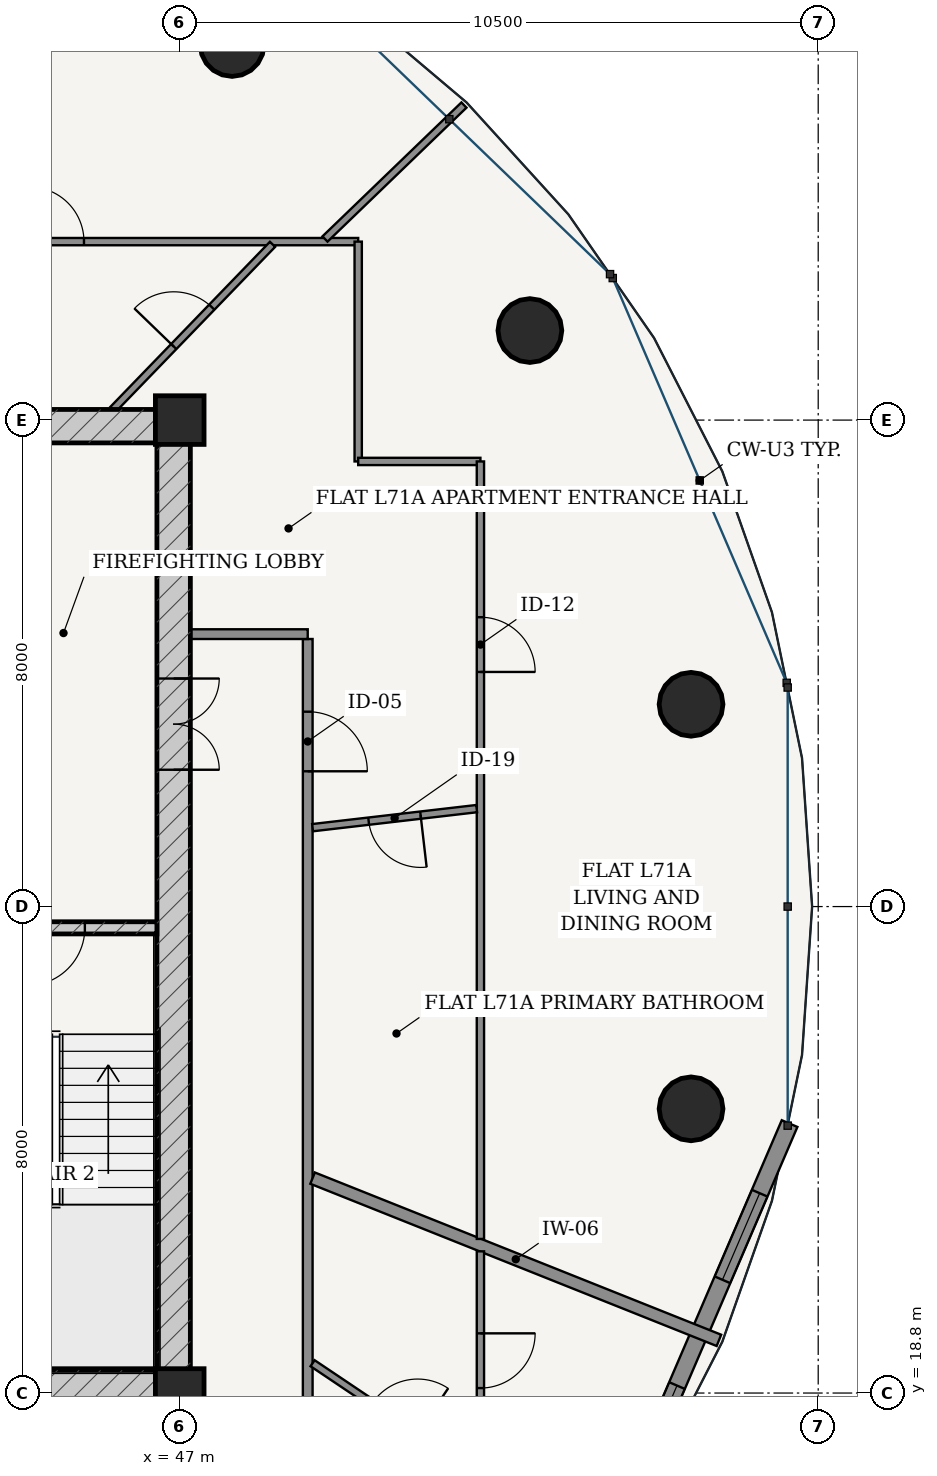
"""IFC4 building model, lengths in metres.
Left out: names, types, materials, properties, quantities, classifications, styles, units other than length and angle.
Written with IfcOpenShell. Run it as: python <this file> out.ifc"""

import sys

from ifc_helpers import new_model, si_unit, direction, frame, frame_2d, origin, origin_2d, place, context, subcontext, project, spatial, rectangle, hollow_circle, extrude, source, transform, mapped, element, fill, save


model = new_model("IFC4")
c1 = context("Model", 3, precision=1e-05, world=origin(), true_north=direction((-0.2419218956, 0.970295726276)))
c2 = subcontext(c1, "Body", "Model", "MODEL_VIEW")
j1 = project(units=[si_unit("LENGTHUNIT", "METRE"), si_unit("PLANEANGLEUNIT", "RADIAN")], contexts=[c1])
p1 = place(None, origin())
s1 = spatial("IfcSite", under=j1, at=p1, CompositionType="ELEMENT")
p2 = place(p1, origin())
s2 = spatial("IfcBuilding", under=s1, at=p2, CompositionType="ELEMENT")
p3 = place(p2, frame((0.0, 0.0, 270.7)))
s3 = spatial("IfcBuildingStorey", under=s2, at=p3, CompositionType="ELEMENT", Elevation=270.7)
for number, where, z_axis, x_axis in (
    (1, (47.0, 18.8, 0.0), (0.0, 0.0, 1.0), (1.0, 0.0, 0.0)),
    (2, (47.0, 34.8, 0.0), (0.0, 0.0, 1.0), (1.0, 0.0, 0.0)),
):
    element("IfcColumn", number, at=place(p3, frame(where, z_axis=z_axis, x_axis=x_axis)), inside=s3, PredefinedType="COLUMN", context=c2, shape_type="SweptSolid", body=[
        extrude(rectangle(XDim=0.8, YDim=0.8, at=origin_2d()), origin(), (0.0, 0.0, 1.0), 3.75),
    ])
p4 = place(p3, frame((28.825, 18.9, 0.0), z_axis=(0.0, 0.0, 1.0), x_axis=(1.0, 0.0, 0.0)))
e3 = element("IfcWall", 3, at=p4, inside=s3, PredefinedType="SHEAR", context=c2, shape_type="SweptSolid", body=[
    extrude(rectangle(XDim=18.35, YDim=0.55, at=frame_2d((9.175, 0.0))), origin(), (0.0, 0.0, 1.0), 3.49),
])
p5 = place(p4, frame((6.71, 0.0, 0.0)))
e4 = element("IfcOpeningElement", 4, at=p5, cuts=e3, PredefinedType="OPENING", context=c2, shape_type="SweptSolid", body=[
    extrude(rectangle(XDim=0.85, YDim=2.1, at=frame_2d((0.425, 1.05))), frame((0.0, 0.285, 0.0), z_axis=(0.0, -1.0, 0.0), x_axis=(1.0, 0.0, 0.0)), (0.0, 0.0, 1.0), 0.57),
])
p6 = place(p4, frame((8.75, 0.0, 0.0)))
e5 = element("IfcOpeningElement", 5, at=p6, cuts=e3, PredefinedType="OPENING", context=c2, shape_type="SweptSolid", body=[
    extrude(rectangle(XDim=0.85, YDim=2.1, at=frame_2d((0.425, 1.05))), frame((0.0, 0.285, 0.0), z_axis=(0.0, -1.0, 0.0), x_axis=(1.0, 0.0, 0.0)), (0.0, 0.0, 1.0), 0.57),
])
p7 = place(p4, frame((10.79, 0.0, 0.0)))
e6 = element("IfcOpeningElement", 6, at=p7, cuts=e3, PredefinedType="OPENING", context=c2, shape_type="SweptSolid", body=[
    extrude(rectangle(XDim=0.85, YDim=2.1, at=frame_2d((0.425, 1.05))), frame((0.0, 0.285, 0.0), z_axis=(0.0, -1.0, 0.0), x_axis=(1.0, 0.0, 0.0)), (0.0, 0.0, 1.0), 0.57),
])
p8 = place(p3, frame((28.825, 34.7, 0.0), z_axis=(0.0, 0.0, 1.0), x_axis=(1.0, 0.0, 0.0)))
e7 = element("IfcWall", 7, at=p8, inside=s3, PredefinedType="SHEAR", context=c2, shape_type="SweptSolid", body=[
    extrude(rectangle(XDim=18.35, YDim=0.55, at=frame_2d((9.175, 0.0))), origin(), (0.0, 0.0, 1.0), 3.49),
])
p9 = place(p3, frame((46.9, 19.175, 0.0), z_axis=(0.0, 0.0, 1.0), x_axis=(0.0, 1.0, 0.0)))
e8 = element("IfcWall", 8, at=p9, inside=s3, PredefinedType="SHEAR", context=c2, shape_type="SweptSolid", body=[
    extrude(rectangle(XDim=15.25, YDim=0.55, at=frame_2d((7.625, 0.0))), origin(), (0.0, 0.0, 1.0), 3.49),
])
p10 = place(p9, frame((9.875, 0.0, 0.0)))
e9 = element("IfcOpeningElement", 9, at=p10, cuts=e8, PredefinedType="OPENING", context=c2, shape_type="SweptSolid", body=[
    extrude(rectangle(XDim=1.5, YDim=2.2, at=frame_2d((0.75, 1.1))), frame((0.0, 0.285, 0.0), z_axis=(0.0, -1.0, 0.0), x_axis=(1.0, 0.0, 0.0)), (0.0, 0.0, 1.0), 0.57),
])
p11 = place(p3, frame((43.305, 26.45, 0.0), z_axis=(0.0, 0.0, 1.0), x_axis=(1.0, 0.0, 0.0)))
e10 = element("IfcWall", 10, at=p11, inside=s3, PredefinedType="SOLIDWALL", context=c2, shape_type="SweptSolid", body=[
    extrude(rectangle(XDim=3.32, YDim=0.2, at=frame_2d((1.66, 0.0))), origin(), (0.0, 0.0, 1.0), 3.49),
])
p12 = place(p11, frame((1.185, 0.0, 0.0)))
e11 = element("IfcOpeningElement", 11, at=p12, cuts=e10, PredefinedType="OPENING", context=c2, shape_type="SweptSolid", body=[
    extrude(rectangle(XDim=0.95, YDim=2.15, at=frame_2d((0.475, 1.075))), frame((0.0, 0.11, 0.0), z_axis=(0.0, -1.0, 0.0), x_axis=(1.0, 0.0, 0.0)), (0.0, 0.0, 1.0), 0.22),
])
for number, where, z_axis, x_axis in (
    (12, (55.409, 30.126, 0.0), (0.0, 0.0, 1.0), (1.0, 0.0, 0.0)),
    (13, (52.759, 36.272, 0.0), (0.0, 0.0, 1.0), (1.0, 0.0, 0.0)),
    (14, (47.861, 40.977, 0.0), (0.0, 0.0, 1.0), (1.0, 0.0, 0.0)),
    (15, (55.409, 23.474, 0.0), (0.0, 0.0, 1.0), (1.0, 0.0, 0.0)),
):
    element("IfcColumn", number, at=place(p3, frame(where, z_axis=z_axis, x_axis=x_axis)), inside=s3, PredefinedType="COLUMN", context=c2, shape_type="SweptSolid", body=[
        extrude(hollow_circle(Radius=0.525, WallThickness=0.035, at=origin_2d()), origin(), (0.0, 0.0, 1.0), 3.75),
    ])
p13 = place(p3, frame((54.074, 16.354, 0.0), z_axis=(0.0, 0.0, 1.0), x_axis=(0.394816612978, 0.918759948037, 0.0)))
e16 = element("IfcWall", 16, at=p13, inside=s3, PredefinedType="SOLIDWALL", context=c2, shape_type="SweptSolid", body=[
    extrude(rectangle(XDim=7.485, YDim=0.28, at=frame_2d((3.743, 0.0))), origin(), (0.0, 0.0, 1.0), 3.49),
])
p14 = place(p13, frame((1.246, 0.0, 0.85)))
e17 = element("IfcOpeningElement", 17, at=p14, cuts=e16, PredefinedType="OPENING", context=c2, shape_type="SweptSolid", body=[
    extrude(rectangle(XDim=1.55, YDim=1.95, at=frame_2d((0.775, 0.975))), frame((0.0, 0.15, 0.0), z_axis=(0.0, -1.0, 0.0), x_axis=(1.0, 0.0, 0.0)), (0.0, 0.0, 1.0), 0.3),
])
p15 = place(p13, frame((4.689, 0.0, 0.85)))
e18 = element("IfcOpeningElement", 18, at=p15, cuts=e16, PredefinedType="OPENING", context=c2, shape_type="SweptSolid", body=[
    extrude(rectangle(XDim=1.55, YDim=1.95, at=frame_2d((0.775, 0.975))), frame((0.0, 0.15, 0.0), z_axis=(0.0, -1.0, 0.0), x_axis=(1.0, 0.0, 0.0)), (0.0, 0.0, 1.0), 0.3),
])
p16 = place(p3, frame((49.105, 17.275, 0.0), z_axis=(0.0, 0.0, 1.0), x_axis=(0.0, 1.0, 0.0)))
e19 = element("IfcWall", 19, at=p16, inside=s3, PredefinedType="PARTITIONING", context=c2, shape_type="SweptSolid", body=[
    extrude(rectangle(XDim=13.925, YDim=0.16, at=frame_2d((6.962, 0.0))), origin(), (0.0, 0.0, 1.0), 3.015),
])
p17 = place(p16, frame((11.75, 0.0, 0.0)))
e20 = element("IfcOpeningElement", 20, at=p17, cuts=e19, PredefinedType="OPENING", context=c2, shape_type="SweptSolid", body=[
    extrude(rectangle(XDim=0.98, YDim=2.2, at=frame_2d((0.49, 1.1))), frame((0.0, 0.09, 0.0), z_axis=(0.0, -1.0, 0.0), x_axis=(1.0, 0.0, 0.0)), (0.0, 0.0, 1.0), 0.18),
])
p18 = place(p3, frame((47.175, 31.28, 0.0), z_axis=(0.0, 0.0, 1.0), x_axis=(1.0, 0.0, 0.0)))
e21 = element("IfcWall", 21, at=p18, inside=s3, PredefinedType="PARTITIONING", context=c2, shape_type="SweptSolid", body=[
    extrude(rectangle(XDim=1.93, YDim=0.16, at=frame_2d((0.965, 0.0))), origin(), (0.0, 0.0, 1.0), 3.49),
])
p19 = place(p3, frame((49.185, 22.334, 0.0), z_axis=(0.0, 0.0, 1.0), x_axis=(0.928710518269, -0.370805573389, 0.0)))
e22 = element("IfcWall", 22, at=p19, inside=s3, PredefinedType="PARTITIONING", context=c2, shape_type="SweptSolid", body=[
    extrude(rectangle(XDim=7.195, YDim=0.2, at=frame_2d((3.598, 0.0))), origin(), (0.0, 0.0, 1.0), 3.121),
])
p20 = place(p3, frame((26.065, 37.735, 0.0), z_axis=(0.0, 0.0, 1.0), x_axis=(1.0, 0.0, 0.0)))
e23 = element("IfcWall", 23, at=p20, inside=s3, PredefinedType="PARTITIONING", context=c2, shape_type="SweptSolid", body=[
    extrude(rectangle(XDim=23.87, YDim=0.12, at=frame_2d((11.935, 0.0))), origin(), (0.0, 0.0, 1.0), 3.015),
])
p21 = place(p20, frame((18.46, 0.0, 0.0)))
e24 = element("IfcOpeningElement", 24, at=p21, cuts=e23, PredefinedType="OPENING", context=c2, shape_type="SweptSolid", body=[
    extrude(rectangle(XDim=0.9, YDim=2.15, at=frame_2d((0.45, 1.075))), frame((0.0, 0.07, 0.0), z_axis=(0.0, -1.0, 0.0), x_axis=(1.0, 0.0, 0.0)), (0.0, 0.0, 1.0), 0.14),
])
p22 = place(p20, frame((3.144, 0.0, 0.0)))
e25 = element("IfcOpeningElement", 25, at=p22, cuts=e23, PredefinedType="OPENING", context=c2, shape_type="SweptSolid", body=[
    extrude(rectangle(XDim=0.9, YDim=2.15, at=frame_2d((0.45, 1.075))), frame((0.0, 0.07, 0.0), z_axis=(0.0, -1.0, 0.0), x_axis=(1.0, 0.0, 0.0)), (0.0, 0.0, 1.0), 0.14),
])
p23 = place(p3, frame((49.935, 37.735, 0.0), z_axis=(0.0, 0.0, 1.0), x_axis=(0.0, -1.0, 0.0)))
e26 = element("IfcWall", 26, at=p23, inside=s3, PredefinedType="PARTITIONING", context=c2, shape_type="SweptSolid", body=[
    extrude(rectangle(XDim=3.615, YDim=0.12, at=frame_2d((1.808, 0.0))), origin(), (0.0, 0.0, 1.0), 3.015),
])
p24 = place(p3, frame((49.935, 34.12, 0.0), z_axis=(0.0, 0.0, 1.0), x_axis=(1.0, 0.0, 0.0)))
e27 = element("IfcWall", 27, at=p24, inside=s3, PredefinedType="PARTITIONING", context=c2, shape_type="SweptSolid", body=[
    extrude(rectangle(XDim=2.01, YDim=0.12, at=frame_2d((1.005, 0.0))), origin(), (0.0, 0.0, 1.0), 3.209),
])
p25 = place(p3, frame((51.945, 34.12, 0.0), z_axis=(0.0, 0.0, 1.0), x_axis=(0.0, -1.0, 0.0)))
e28 = element("IfcWall", 28, at=p25, inside=s3, PredefinedType="PARTITIONING", context=c2, shape_type="SweptSolid", body=[
    extrude(rectangle(XDim=12.786, YDim=0.12, at=frame_2d((6.393, 0.0))), origin(), (0.0, 0.0, 1.0), 3.015),
])
p26 = place(p25, frame((2.562, 0.0, 0.0)))
e29 = element("IfcOpeningElement", 29, at=p26, cuts=e28, PredefinedType="OPENING", context=c2, shape_type="SweptSolid", body=[
    extrude(rectangle(XDim=0.9, YDim=2.15, at=frame_2d((0.45, 1.075))), frame((0.0, 0.07, 0.0), z_axis=(0.0, -1.0, 0.0), x_axis=(1.0, 0.0, 0.0)), (0.0, 0.0, 1.0), 0.14),
])
p27 = place(p3, frame((49.389, 37.778, 0.0), z_axis=(0.0, 0.0, 1.0), x_axis=(0.719985652574, 0.693988948102, 0.0)))
e30 = element("IfcWall", 30, at=p27, inside=s3, PredefinedType="PARTITIONING", context=c2, shape_type="SweptSolid", body=[
    extrude(rectangle(XDim=3.174, YDim=0.12, at=frame_2d((1.587, 0.0))), origin(), (0.0, 0.0, 1.0), 3.121),
])
p28 = place(p3, frame((49.185, 28.098, 0.0), z_axis=(0.0, 0.0, 1.0), x_axis=(0.993339475655, 0.115224503057, 0.0)))
e31 = element("IfcWall", 31, at=p28, inside=s3, PredefinedType="PARTITIONING", context=c2, shape_type="SweptSolid", body=[
    extrude(rectangle(XDim=2.716, YDim=0.12, at=frame_2d((1.358, 0.0))), origin(), (0.0, 0.0, 1.0), 3.209),
])
p29 = place(p28, frame((0.928, 0.0, 0.0)))
e32 = element("IfcOpeningElement", 32, at=p29, cuts=e31, PredefinedType="OPENING", context=c2, shape_type="SweptSolid", body=[
    extrude(rectangle(XDim=0.86, YDim=2.15, at=frame_2d((0.43, 1.075))), frame((0.0, 0.07, 0.0), z_axis=(0.0, -1.0, 0.0), x_axis=(1.0, 0.0, 0.0)), (0.0, 0.0, 1.0), 0.14),
])
p30 = place(p3, frame((45.903, 34.976, 0.0), z_axis=(0.0, 0.0, 1.0), x_axis=(0.69497417129, 0.719034700999, 0.0)))
e33 = element("IfcWall", 33, at=p30, inside=s3, PredefinedType="PARTITIONING", context=c2, shape_type="SweptSolid", body=[
    extrude(rectangle(XDim=3.775, YDim=0.12, at=frame_2d((1.887, 0.0))), origin(), (0.0, 0.0, 1.0), 3.015),
])
p31 = place(p30, frame((1.437, 0.0, 0.0)))
e34 = element("IfcOpeningElement", 34, at=p31, cuts=e33, PredefinedType="OPENING", context=c2, shape_type="SweptSolid", body=[
    extrude(rectangle(XDim=0.9, YDim=2.15, at=frame_2d((0.45, 1.075))), frame((0.0, 0.07, 0.0), z_axis=(0.0, -1.0, 0.0), x_axis=(1.0, 0.0, 0.0)), (0.0, 0.0, 1.0), 0.14),
])
p32 = place(p3, frame((51.945, 21.13, 0.0), z_axis=(0.0, 0.0, 1.0), x_axis=(0.0, -1.0, 0.0)))
e35 = element("IfcWall", 35, at=p32, inside=s3, PredefinedType="PARTITIONING", context=c2, shape_type="SweptSolid", body=[
    extrude(rectangle(XDim=6.775, YDim=0.12, at=frame_2d((3.388, 0.0))), origin(), (0.0, 0.0, 1.0), 3.015),
])
p33 = place(p32, frame((1.349, 0.0, 0.0)))
e36 = element("IfcOpeningElement", 36, at=p33, cuts=e35, PredefinedType="OPENING", context=c2, shape_type="SweptSolid", body=[
    extrude(rectangle(XDim=0.9, YDim=2.15, at=frame_2d((0.45, 1.075))), frame((0.0, 0.07, 0.0), z_axis=(0.0, -1.0, 0.0), x_axis=(1.0, 0.0, 0.0)), (0.0, 0.0, 1.0), 0.14),
])
p34 = place(p3, frame((49.185, 19.29, 0.0), z_axis=(0.0, 0.0, 1.0), x_axis=(0.830215193761, -0.557443030316, 0.0)))
e37 = element("IfcWall", 37, at=p34, inside=s3, PredefinedType="PARTITIONING", context=c2, shape_type="SweptSolid", body=[
    extrude(rectangle(XDim=3.262, YDim=0.12, at=frame_2d((1.631, 0.0))), origin(), (0.0, 0.0, 1.0), 3.209),
])
p35 = place(p34, frame((1.181, 0.0, 0.0)))
e38 = element("IfcOpeningElement", 38, at=p35, cuts=e37, PredefinedType="OPENING", context=c2, shape_type="SweptSolid", body=[
    extrude(rectangle(XDim=0.9, YDim=2.15, at=frame_2d((0.45, 1.075))), frame((0.0, 0.07, 0.0), z_axis=(0.0, -1.0, 0.0), x_axis=(1.0, 0.0, 0.0)), (0.0, 0.0, 1.0), 0.14),
])
m1 = source(origin(), c2, "Body", "SweptSolid", [
    extrude(rectangle(XDim=1.55, YDim=1.95, at=frame_2d((0.775, 0.975))), frame((0.0, 0.03, 0.0), z_axis=(0.0, -1.0, 0.0), x_axis=(1.0, 0.0, 0.0)), (0.0, 0.0, 1.0), 0.06),
])
p36 = place(p14, origin())
e39 = element("IfcWindow", 39, at=p36, inside=s3, PartitioningType="SINGLE_PANEL", PredefinedType="WINDOW", context=c2, shape_type="MappedRepresentation", body=[
    mapped(m1, transform((0.0, 0.0, 0.0), scale=1.0)),
])
fill(e17, e39)
p37 = place(p15, origin())
e40 = element("IfcWindow", 40, at=p37, inside=s3, PartitioningType="SINGLE_PANEL", PredefinedType="WINDOW", context=c2, shape_type="MappedRepresentation", body=[
    mapped(m1, transform((0.0, 0.0, 0.0), scale=1.0)),
])
fill(e18, e40)
m2 = source(origin(), c2, "Body", "SweptSolid", [
    extrude(rectangle(XDim=1.5, YDim=2.2, at=frame_2d((0.75, 1.1))), frame((0.0, 0.025, 0.0), z_axis=(0.0, -1.0, 0.0), x_axis=(1.0, 0.0, 0.0)), (0.0, 0.0, 1.0), 0.05),
])
p38 = place(p10, frame((1.5, 0.0, 0.0), z_axis=(0.0, 0.0, 1.0), x_axis=(-1.0, 0.0, 0.0)))
e41 = element("IfcDoor", 41, at=p38, inside=s3, OperationType="DOUBLE_DOOR_SINGLE_SWING", PredefinedType="DOOR", context=c2, shape_type="MappedRepresentation", body=[
    mapped(m2, transform((0.0, 0.0, 0.0), scale=1.0)),
])
fill(e9, e41)
m3 = source(origin(), c2, "Body", "SweptSolid", [
    extrude(rectangle(XDim=0.95, YDim=2.15, at=frame_2d((0.475, 1.075))), frame((0.0, 0.025, 0.0), z_axis=(0.0, -1.0, 0.0), x_axis=(1.0, 0.0, 0.0)), (0.0, 0.0, 1.0), 0.05),
])
p39 = place(p12, frame((0.95, 0.0, 0.0), z_axis=(0.0, 0.0, 1.0), x_axis=(-1.0, 0.0, 0.0)))
e42 = element("IfcDoor", 42, at=p39, inside=s3, OperationType="SINGLE_SWING_RIGHT", PredefinedType="DOOR", context=c2, shape_type="MappedRepresentation", body=[
    mapped(m3, transform((0.0, 0.0, 0.0), scale=1.0)),
])
fill(e11, e42)
m4 = source(origin(), c2, "Body", "SweptSolid", [
    extrude(rectangle(XDim=0.98, YDim=2.2, at=frame_2d((0.49, 1.1))), frame((0.0, 0.025, 0.0), z_axis=(0.0, -1.0, 0.0), x_axis=(1.0, 0.0, 0.0)), (0.0, 0.0, 1.0), 0.05),
])
p40 = place(p17, frame((0.98, 0.0, 0.0), z_axis=(0.0, 0.0, 1.0), x_axis=(-1.0, 0.0, 0.0)))
e43 = element("IfcDoor", 43, at=p40, inside=s3, OperationType="SINGLE_SWING_RIGHT", PredefinedType="DOOR", context=c2, shape_type="MappedRepresentation", body=[
    mapped(m4, transform((0.0, 0.0, 0.0), scale=1.0)),
])
fill(e20, e43)
m5 = source(origin(), c2, "Body", "SweptSolid", [
    extrude(rectangle(XDim=0.86, YDim=2.15, at=frame_2d((0.43, 1.075))), frame((0.0, 0.025, 0.0), z_axis=(0.0, -1.0, 0.0), x_axis=(1.0, 0.0, 0.0)), (0.0, 0.0, 1.0), 0.05),
])
p41 = place(p29, frame((0.86, 0.0, 0.0), z_axis=(0.0, 0.0, 1.0), x_axis=(-1.0, 0.0, 0.0)))
e44 = element("IfcDoor", 44, at=p41, inside=s3, OperationType="SINGLE_SWING_LEFT", PredefinedType="DOOR", context=c2, shape_type="MappedRepresentation", body=[
    mapped(m5, transform((0.0, 0.0, 0.0), scale=1.0)),
])
fill(e32, e44)
m6 = source(origin(), c2, "Body", "SweptSolid", [
    extrude(rectangle(XDim=0.9, YDim=2.15, at=frame_2d((0.45, 1.075))), frame((0.0, 0.025, 0.0), z_axis=(0.0, -1.0, 0.0), x_axis=(1.0, 0.0, 0.0)), (0.0, 0.0, 1.0), 0.05),
])
p42 = place(p26, origin())
e45 = element("IfcDoor", 45, at=p42, inside=s3, OperationType="SINGLE_SWING_RIGHT", PredefinedType="DOOR", context=c2, shape_type="MappedRepresentation", body=[
    mapped(m6, transform((0.0, 0.0, 0.0), scale=1.0)),
])
fill(e29, e45)
p43 = place(p31, origin())
e46 = element("IfcDoor", 46, at=p43, inside=s3, OperationType="SINGLE_SWING_LEFT", PredefinedType="DOOR", context=c2, shape_type="MappedRepresentation", body=[
    mapped(m6, transform((0.0, 0.0, 0.0), scale=1.0)),
])
fill(e34, e46)
p44 = place(p21, origin())
e47 = element("IfcDoor", 47, at=p44, inside=s3, OperationType="SINGLE_SWING_LEFT", PredefinedType="DOOR", context=c2, shape_type="MappedRepresentation", body=[
    mapped(m6, transform((0.0, 0.0, 0.0), scale=1.0)),
])
fill(e24, e47)
p45 = place(p33, origin())
e48 = element("IfcDoor", 48, at=p45, inside=s3, OperationType="SINGLE_SWING_LEFT", PredefinedType="DOOR", context=c2, shape_type="MappedRepresentation", body=[
    mapped(m6, transform((0.0, 0.0, 0.0), scale=1.0)),
])
fill(e36, e48)
save(model, sys.argv[1])
